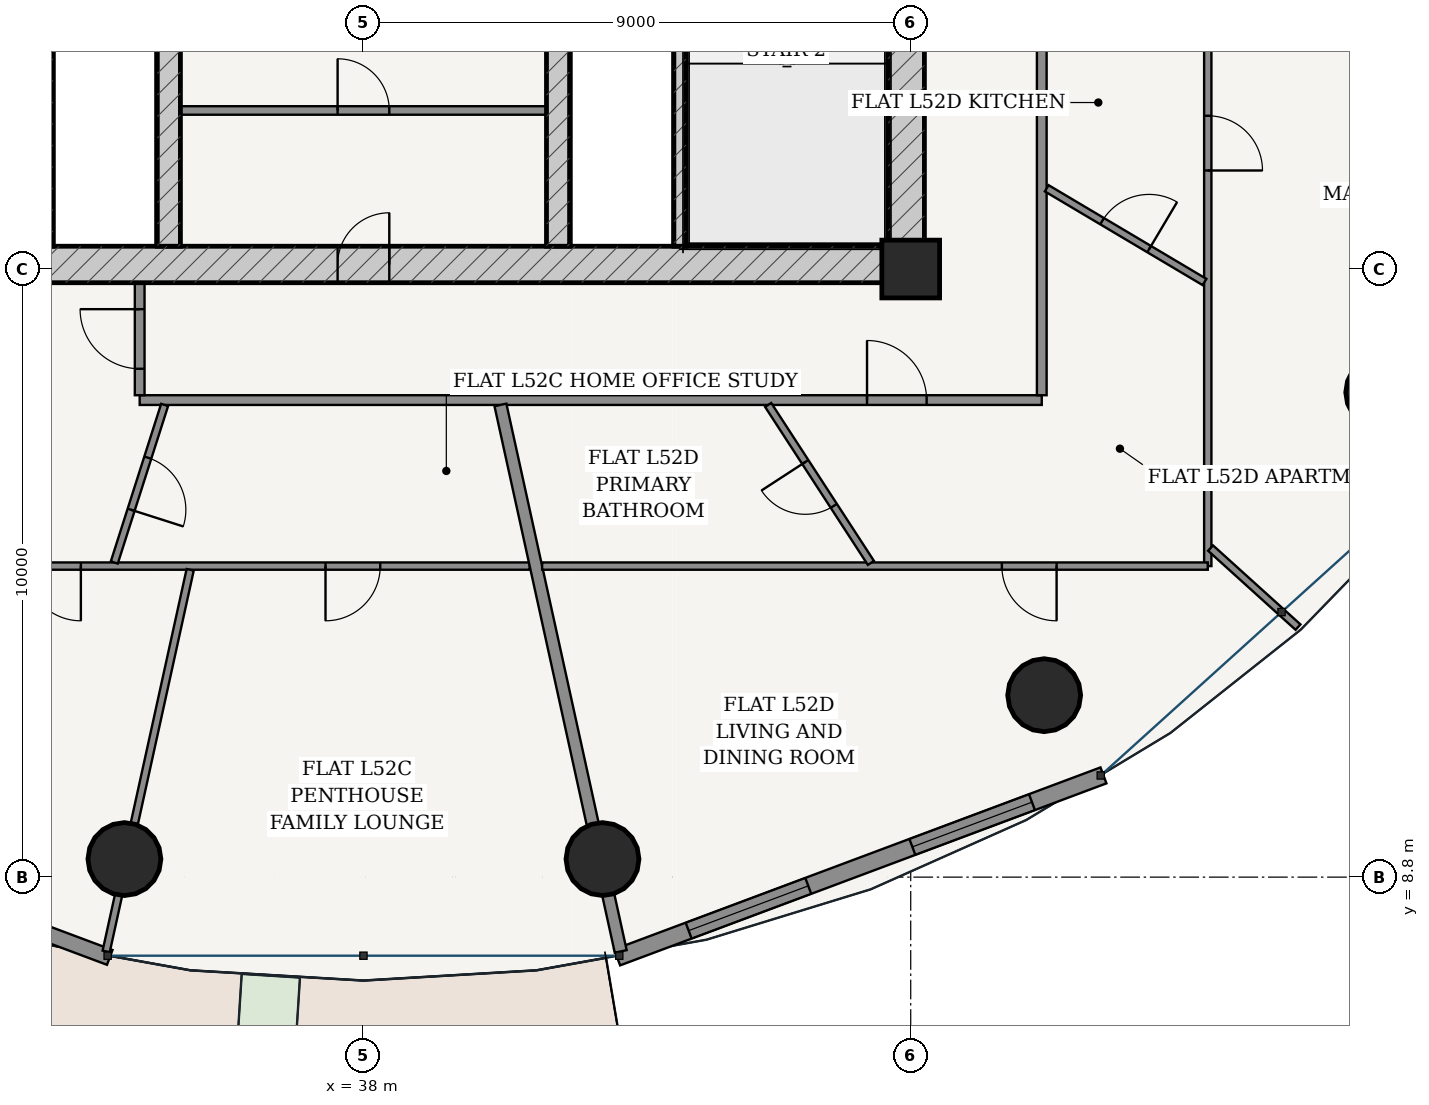
"""IFC4 building model, lengths in metres.
Left out: names, types, materials, properties, quantities, classifications, styles, units other than length and angle.
Written with IfcOpenShell. Run it as: python <this file> out.ifc"""

import sys

from ifc_helpers import new_model, si_unit, direction, frame, frame_2d, origin, origin_2d, place, context, subcontext, project, spatial, rectangle, hollow_circle, extrude, source, transform, mapped, element, fill, save


model = new_model("IFC4")
c1 = context("Model", 3, precision=1e-05, world=origin(), true_north=direction((-0.2419218956, 0.970295726276)))
c2 = subcontext(c1, "Body", "Model", "MODEL_VIEW")
j1 = project(units=[si_unit("LENGTHUNIT", "METRE"), si_unit("PLANEANGLEUNIT", "RADIAN")], contexts=[c1])
p1 = place(None, origin())
s1 = spatial("IfcSite", under=j1, at=p1, CompositionType="ELEMENT")
p2 = place(p1, origin())
s2 = spatial("IfcBuilding", under=s1, at=p2, CompositionType="ELEMENT")
p3 = place(p2, frame((0.0, 0.0, 198.6)))
s3 = spatial("IfcBuildingStorey", under=s2, at=p3, CompositionType="ELEMENT", Elevation=198.6)
p4 = place(p3, frame((47.0, 18.8, 0.0), z_axis=(0.0, 0.0, 1.0), x_axis=(1.0, 0.0, 0.0)))
e1 = element("IfcColumn", 1, at=p4, inside=s3, PredefinedType="COLUMN", context=c2, shape_type="SweptSolid", body=[
    extrude(rectangle(XDim=0.95, YDim=0.95, at=origin_2d()), origin(), (0.0, 0.0, 1.0), 3.7),
])
p5 = place(p3, frame((28.775, 18.875, 0.0), z_axis=(0.0, 0.0, 1.0), x_axis=(1.0, 0.0, 0.0)))
e2 = element("IfcWall", 2, at=p5, inside=s3, PredefinedType="SHEAR", context=c2, shape_type="SweptSolid", body=[
    extrude(rectangle(XDim=18.45, YDim=0.6, at=frame_2d((9.225, 0.0))), origin(), (0.0, 0.0, 1.0), 3.435),
])
p6 = place(p5, frame((8.8, 0.0, 0.0)))
e3 = element("IfcOpeningElement", 3, at=p6, cuts=e2, PredefinedType="OPENING", context=c2, shape_type="SweptSolid", body=[
    extrude(rectangle(XDim=0.85, YDim=2.1, at=frame_2d((0.425, 1.05))), frame((0.0, 0.31, 0.0), z_axis=(0.0, -1.0, 0.0), x_axis=(1.0, 0.0, 0.0)), (0.0, 0.0, 1.0), 0.62),
])
p7 = place(p3, frame((46.925, 19.175, 0.0), z_axis=(0.0, 0.0, 1.0), x_axis=(0.0, 1.0, 0.0)))
e4 = element("IfcWall", 4, at=p7, inside=s3, PredefinedType="SHEAR", context=c2, shape_type="SweptSolid", body=[
    extrude(rectangle(XDim=15.25, YDim=0.6, at=frame_2d((7.625, 0.0))), origin(), (0.0, 0.0, 1.0), 3.435),
])
p8 = place(p7, frame((9.875, 0.0, 0.0)))
e5 = element("IfcOpeningElement", 5, at=p8, cuts=e4, PredefinedType="OPENING", context=c2, shape_type="SweptSolid", body=[
    extrude(rectangle(XDim=1.5, YDim=2.2, at=frame_2d((0.75, 1.1))), frame((0.0, 0.31, 0.0), z_axis=(0.0, -1.0, 0.0), x_axis=(1.0, 0.0, 0.0)), (0.0, 0.0, 1.0), 0.62),
])
for number, where, z_axis, x_axis in (
    (6, (32.795, 19.175, 0.0), (0.0, 0.0, 1.0), (0.0, 1.0, 0.0)),
    (7, (43.205, 19.175, 0.0), (0.0, 0.0, 1.0), (0.0, 1.0, 0.0)),
):
    element("IfcWall", number, at=place(p3, frame(where, z_axis=z_axis, x_axis=x_axis)), inside=s3, PredefinedType="SOLIDWALL", context=c2, shape_type="SweptSolid", body=[
        extrude(rectangle(XDim=7.375, YDim=0.2, at=frame_2d((3.688, 0.0))), origin(), (0.0, 0.0, 1.0), 3.435),
    ])
p9 = place(p3, frame((34.8, 19.175, 0.0), z_axis=(0.0, 0.0, 1.0), x_axis=(0.0, 1.0, 0.0)))
e8 = element("IfcWall", 8, at=p9, inside=s3, PredefinedType="SHEAR", context=c2, shape_type="SweptSolid", body=[
    extrude(rectangle(XDim=15.25, YDim=0.38, at=frame_2d((7.625, 0.0))), origin(), (0.0, 0.0, 1.0), 3.435),
])
p10 = place(p9, frame((7.8, 0.0, 0.0)))
e9 = element("IfcOpeningElement", 9, at=p10, cuts=e8, PredefinedType="OPENING", context=c2, shape_type="SweptSolid", body=[
    extrude(rectangle(XDim=1.05, YDim=2.15, at=frame_2d((0.525, 1.075))), frame((0.0, 0.2, 0.0), z_axis=(0.0, -1.0, 0.0), x_axis=(1.0, 0.0, 0.0)), (0.0, 0.0, 1.0), 0.4),
])
p11 = place(p3, frame((41.2, 19.175, 0.0), z_axis=(0.0, 0.0, 1.0), x_axis=(0.0, 1.0, 0.0)))
e10 = element("IfcWall", 10, at=p11, inside=s3, PredefinedType="SHEAR", context=c2, shape_type="SweptSolid", body=[
    extrude(rectangle(XDim=15.25, YDim=0.38, at=frame_2d((7.625, 0.0))), origin(), (0.0, 0.0, 1.0), 3.435),
])
p12 = place(p11, frame((7.8, 0.0, 0.0)))
e11 = element("IfcOpeningElement", 11, at=p12, cuts=e10, PredefinedType="OPENING", context=c2, shape_type="SweptSolid", body=[
    extrude(rectangle(XDim=1.05, YDim=2.15, at=frame_2d((0.525, 1.075))), frame((0.0, 0.2, 0.0), z_axis=(0.0, -1.0, 0.0), x_axis=(1.0, 0.0, 0.0)), (0.0, 0.0, 1.0), 0.4),
])
for number, where, z_axis, x_axis in (
    (12, (34.069, 9.097, 0.0), (0.0, 0.0, 1.0), (1.0, 0.0, 0.0)),
    (13, (41.931, 9.097, 0.0), (0.0, 0.0, 1.0), (1.0, 0.0, 0.0)),
    (14, (49.195, 11.792, 0.0), (0.0, 0.0, 1.0), (1.0, 0.0, 0.0)),
    (15, (54.754, 16.772, 0.0), (0.0, 0.0, 1.0), (1.0, 0.0, 0.0)),
):
    element("IfcColumn", number, at=place(p3, frame(where, z_axis=z_axis, x_axis=x_axis)), inside=s3, PredefinedType="COLUMN", context=c2, shape_type="SweptSolid", body=[
        extrude(hollow_circle(Radius=0.6, WallThickness=0.038, at=origin_2d()), origin(), (0.0, 0.0, 1.0), 3.7),
    ])
p13 = place(p3, frame((25.83, 10.473, 0.0), z_axis=(0.0, 0.0, 1.0), x_axis=(0.936556918375, -0.350515532672, 0.0)))
e16 = element("IfcWall", 16, at=p13, inside=s3, PredefinedType="SOLIDWALL", context=c2, shape_type="SweptSolid", body=[
    extrude(rectangle(XDim=8.539, YDim=0.26, at=frame_2d((4.27, 0.0))), origin(), (0.0, 0.0, 1.0), 3.435),
])
p14 = place(p13, frame((3.594, 0.0, 0.0)))
e17 = element("IfcOpeningElement", 17, at=p14, cuts=e16, PredefinedType="OPENING", context=c2, shape_type="SweptSolid", body=[
    extrude(rectangle(XDim=1.35, YDim=2.2, at=frame_2d((0.675, 1.1))), frame((0.0, 0.14, 0.0), z_axis=(0.0, -1.0, 0.0), x_axis=(1.0, 0.0, 0.0)), (0.0, 0.0, 1.0), 0.28),
])
p15 = place(p3, frame((42.172, 7.48, 0.0), z_axis=(0.0, 0.0, 1.0), x_axis=(0.936556918375, 0.350515532672, 0.0)))
e18 = element("IfcWall", 18, at=p15, inside=s3, PredefinedType="SOLIDWALL", context=c2, shape_type="SweptSolid", body=[
    extrude(rectangle(XDim=8.539, YDim=0.28, at=frame_2d((4.27, 0.0))), origin(), (0.0, 0.0, 1.0), 3.435),
])
p16 = place(p15, frame((1.256, 0.0, 0.85)))
e19 = element("IfcOpeningElement", 19, at=p16, cuts=e18, PredefinedType="OPENING", context=c2, shape_type="SweptSolid", body=[
    extrude(rectangle(XDim=2.1, YDim=1.95, at=frame_2d((1.05, 0.975))), frame((0.0, 0.15, 0.0), z_axis=(0.0, -1.0, 0.0), x_axis=(1.0, 0.0, 0.0)), (0.0, 0.0, 1.0), 0.3),
])
p17 = place(p15, frame((5.184, 0.0, 0.85)))
e20 = element("IfcOpeningElement", 20, at=p17, cuts=e18, PredefinedType="OPENING", context=c2, shape_type="SweptSolid", body=[
    extrude(rectangle(XDim=2.1, YDim=1.95, at=frame_2d((1.05, 0.975))), frame((0.0, 0.15, 0.0), z_axis=(0.0, -1.0, 0.0), x_axis=(1.0, 0.0, 0.0)), (0.0, 0.0, 1.0), 0.3),
])
p18 = place(p3, frame((34.99, 21.407, 0.0), z_axis=(0.0, 0.0, 1.0), x_axis=(1.0, 0.0, 0.0)))
e21 = element("IfcWall", 21, at=p18, inside=s3, PredefinedType="PARTITIONING", context=c2, shape_type="SweptSolid", body=[
    extrude(rectangle(XDim=6.02, YDim=0.14, at=frame_2d((3.01, 0.0))), origin(), (0.0, 0.0, 1.0), 3.435),
])
p19 = place(p18, frame((2.585, 0.0, 0.0)))
e22 = element("IfcOpeningElement", 22, at=p19, cuts=e21, PredefinedType="OPENING", context=c2, shape_type="SweptSolid", body=[
    extrude(rectangle(XDim=0.85, YDim=2.1, at=frame_2d((0.425, 1.05))), frame((0.0, 0.08, 0.0), z_axis=(0.0, -1.0, 0.0), x_axis=(1.0, 0.0, 0.0)), (0.0, 0.0, 1.0), 0.16),
])
p20 = place(p3, frame((34.32, 16.645, 0.0), z_axis=(0.0, 0.0, 1.0), x_axis=(1.0, 0.0, 0.0)))
e23 = element("IfcWall", 23, at=p20, inside=s3, PredefinedType="PARTITIONING", context=c2, shape_type="SweptSolid", body=[
    extrude(rectangle(XDim=14.835, YDim=0.16, at=frame_2d((7.417, 0.0))), origin(), (0.0, 0.0, 1.0), 2.951),
])
p21 = place(p20, frame((11.961, 0.0, 0.0)))
e24 = element("IfcOpeningElement", 24, at=p21, cuts=e23, PredefinedType="OPENING", context=c2, shape_type="SweptSolid", body=[
    extrude(rectangle(XDim=0.98, YDim=2.2, at=frame_2d((0.49, 1.1))), frame((0.0, 0.09, 0.0), z_axis=(0.0, -1.0, 0.0), x_axis=(1.0, 0.0, 0.0)), (0.0, 0.0, 1.0), 0.18),
])
p22 = place(p3, frame((34.32, 16.725, 0.0), z_axis=(0.0, 0.0, 1.0), x_axis=(0.0, 1.0, 0.0)))
e25 = element("IfcWall", 25, at=p22, inside=s3, PredefinedType="PARTITIONING", context=c2, shape_type="SweptSolid", body=[
    extrude(rectangle(XDim=1.85, YDim=0.16, at=frame_2d((0.925, 0.0))), origin(), (0.0, 0.0, 1.0), 3.435),
])
p23 = place(p22, frame((0.435, 0.0, 0.0)))
e26 = element("IfcOpeningElement", 26, at=p23, cuts=e25, PredefinedType="OPENING", context=c2, shape_type="SweptSolid", body=[
    extrude(rectangle(XDim=0.98, YDim=2.2, at=frame_2d((0.49, 1.1))), frame((0.0, 0.09, 0.0), z_axis=(0.0, -1.0, 0.0), x_axis=(1.0, 0.0, 0.0)), (0.0, 0.0, 1.0), 0.18),
])
p24 = place(p3, frame((49.155, 16.725, 0.0), z_axis=(0.0, 0.0, 1.0), x_axis=(0.0, 1.0, 0.0)))
e27 = element("IfcWall", 27, at=p24, inside=s3, PredefinedType="PARTITIONING", context=c2, shape_type="SweptSolid", body=[
    extrude(rectangle(XDim=18.3, YDim=0.16, at=frame_2d((9.15, 0.0))), origin(), (0.0, 0.0, 1.0), 2.951),
])
p25 = place(p3, frame((40.734, 13.915, 0.0), z_axis=(0.0, 0.0, 1.0), x_axis=(-1.0, 0.0, 0.0)))
e28 = element("IfcWall", 28, at=p25, inside=s3, PredefinedType="PARTITIONING", context=c2, shape_type="SweptSolid", body=[
    extrude(rectangle(XDim=9.144, YDim=0.12, at=frame_2d((4.572, 0.0))), origin(), (0.0, 0.0, 1.0), 2.951),
])
p26 = place(p25, frame((7.381, 0.0, 0.0)))
e29 = element("IfcOpeningElement", 29, at=p26, cuts=e28, PredefinedType="OPENING", context=c2, shape_type="SweptSolid", body=[
    extrude(rectangle(XDim=0.9, YDim=2.15, at=frame_2d((0.45, 1.075))), frame((0.0, 0.07, 0.0), z_axis=(0.0, -1.0, 0.0), x_axis=(1.0, 0.0, 0.0)), (0.0, 0.0, 1.0), 0.14),
])
p27 = place(p25, frame((2.458, 0.0, 0.0)))
e30 = element("IfcOpeningElement", 30, at=p27, cuts=e28, PredefinedType="OPENING", context=c2, shape_type="SweptSolid", body=[
    extrude(rectangle(XDim=0.9, YDim=2.15, at=frame_2d((0.45, 1.075))), frame((0.0, 0.07, 0.0), z_axis=(0.0, -1.0, 0.0), x_axis=(1.0, 0.0, 0.0)), (0.0, 0.0, 1.0), 0.14),
])
p28 = place(p3, frame((35.15, 13.854, 0.0), z_axis=(0.0, 0.0, 1.0), x_axis=(-0.214942949264, -0.976626606519, 0.0)))
e31 = element("IfcWall", 31, at=p28, inside=s3, PredefinedType="PARTITIONING", context=c2, shape_type="SweptSolid", body=[
    extrude(rectangle(XDim=6.427, YDim=0.12, at=frame_2d((3.213, 0.0))), origin(), (0.0, 0.0, 1.0), 2.951),
])
p29 = place(p3, frame((34.73, 16.565, 0.0), z_axis=(0.0, 0.0, 1.0), x_axis=(-0.304300161081, -0.952576197459, 0.0)))
e32 = element("IfcWall", 32, at=p29, inside=s3, PredefinedType="PARTITIONING", context=c2, shape_type="SweptSolid", body=[
    extrude(rectangle(XDim=2.72, YDim=0.12, at=frame_2d((1.36, 0.0))), origin(), (0.0, 0.0, 1.0), 3.11),
])
p30 = place(p29, frame((0.91, 0.0, 0.0)))
e33 = element("IfcOpeningElement", 33, at=p30, cuts=e32, PredefinedType="OPENING", context=c2, shape_type="SweptSolid", body=[
    extrude(rectangle(XDim=0.9, YDim=2.15, at=frame_2d((0.45, 1.075))), frame((0.0, 0.07, 0.0), z_axis=(0.0, -1.0, 0.0), x_axis=(1.0, 0.0, 0.0)), (0.0, 0.0, 1.0), 0.14),
])
p31 = place(p3, frame((40.253, 16.565, 0.0), z_axis=(0.0, 0.0, 1.0), x_axis=(0.214957946814, -0.976623305631, 0.0)))
e34 = element("IfcWall", 34, at=p31, inside=s3, PredefinedType="PARTITIONING", context=c2, shape_type="SweptSolid", body=[
    extrude(rectangle(XDim=9.202, YDim=0.2, at=frame_2d((4.601, 0.0))), origin(), (0.0, 0.0, 1.0), 2.951),
])
p32 = place(p3, frame((51.885, 29.194, 0.0), z_axis=(0.0, 0.0, 1.0), x_axis=(0.0, -1.0, 0.0)))
e35 = element("IfcWall", 35, at=p32, inside=s3, PredefinedType="PARTITIONING", context=c2, shape_type="SweptSolid", body=[
    extrude(rectangle(XDim=15.279, YDim=0.12, at=frame_2d((7.639, 0.0))), origin(), (0.0, 0.0, 1.0), 2.951),
])
p33 = place(p32, frame((7.873, 0.0, 0.0)))
e36 = element("IfcOpeningElement", 36, at=p33, cuts=e35, PredefinedType="OPENING", context=c2, shape_type="SweptSolid", body=[
    extrude(rectangle(XDim=0.9, YDim=2.15, at=frame_2d((0.45, 1.075))), frame((0.0, 0.07, 0.0), z_axis=(0.0, -1.0, 0.0), x_axis=(1.0, 0.0, 0.0)), (0.0, 0.0, 1.0), 0.14),
])
p34 = place(p3, frame((51.885, 13.915, 0.0), z_axis=(0.0, 0.0, 1.0), x_axis=(-1.0, 0.0, 0.0)))
e37 = element("IfcWall", 37, at=p34, inside=s3, PredefinedType="PARTITIONING", context=c2, shape_type="SweptSolid", body=[
    extrude(rectangle(XDim=10.947, YDim=0.12, at=frame_2d((5.473, 0.0))), origin(), (0.0, 0.0, 1.0), 2.951),
])
p35 = place(p34, frame((2.486, 0.0, 0.0)))
e38 = element("IfcOpeningElement", 38, at=p35, cuts=e37, PredefinedType="OPENING", context=c2, shape_type="SweptSolid", body=[
    extrude(rectangle(XDim=0.9, YDim=2.15, at=frame_2d((0.45, 1.075))), frame((0.0, 0.07, 0.0), z_axis=(0.0, -1.0, 0.0), x_axis=(1.0, 0.0, 0.0)), (0.0, 0.0, 1.0), 0.14),
])
p36 = place(p3, frame((51.931, 14.211, 0.0), z_axis=(0.0, 0.0, 1.0), x_axis=(0.741971265209, -0.670431683026, 0.0)))
e39 = element("IfcWall", 39, at=p36, inside=s3, PredefinedType="PARTITIONING", context=c2, shape_type="SweptSolid", body=[
    extrude(rectangle(XDim=1.938, YDim=0.12, at=frame_2d((0.969, 0.0))), origin(), (0.0, 0.0, 1.0), 2.951),
])
p37 = place(p3, frame((44.656, 16.565, 0.0), z_axis=(0.0, 0.0, 1.0), x_axis=(0.545173870382, -0.838322999239, 0.0)))
e40 = element("IfcWall", 40, at=p37, inside=s3, PredefinedType="PARTITIONING", context=c2, shape_type="SweptSolid", body=[
    extrude(rectangle(XDim=3.099, YDim=0.12, at=frame_2d((1.549, 0.0))), origin(), (0.0, 0.0, 1.0), 3.11),
])
p38 = place(p37, frame((1.119, 0.0, 0.0)))
e41 = element("IfcOpeningElement", 41, at=p38, cuts=e40, PredefinedType="OPENING", context=c2, shape_type="SweptSolid", body=[
    extrude(rectangle(XDim=0.86, YDim=2.15, at=frame_2d((0.43, 1.075))), frame((0.0, 0.07, 0.0), z_axis=(0.0, -1.0, 0.0), x_axis=(1.0, 0.0, 0.0)), (0.0, 0.0, 1.0), 0.14),
])
p39 = place(p3, frame((49.237, 20.128, 0.0), z_axis=(0.0, 0.0, 1.0), x_axis=(0.859818120481, -0.510600430565, 0.0)))
e42 = element("IfcWall", 42, at=p39, inside=s3, PredefinedType="PARTITIONING", context=c2, shape_type="SweptSolid", body=[
    extrude(rectangle(XDim=3.018, YDim=0.12, at=frame_2d((1.509, 0.0))), origin(), (0.0, 0.0, 1.0), 2.951),
])
p40 = place(p39, frame((1.059, 0.0, 0.0)))
e43 = element("IfcOpeningElement", 43, at=p40, cuts=e42, PredefinedType="OPENING", context=c2, shape_type="SweptSolid", body=[
    extrude(rectangle(XDim=0.9, YDim=2.15, at=frame_2d((0.45, 1.075))), frame((0.0, 0.07, 0.0), z_axis=(0.0, -1.0, 0.0), x_axis=(1.0, 0.0, 0.0)), (0.0, 0.0, 1.0), 0.14),
])
m1 = source(origin(), c2, "Body", "SweptSolid", [
    extrude(rectangle(XDim=2.1, YDim=1.95, at=frame_2d((1.05, 0.975))), frame((0.0, 0.03, 0.0), z_axis=(0.0, -1.0, 0.0), x_axis=(1.0, 0.0, 0.0)), (0.0, 0.0, 1.0), 0.06),
])
p41 = place(p16, origin())
e44 = element("IfcWindow", 44, at=p41, inside=s3, PartitioningType="SINGLE_PANEL", PredefinedType="WINDOW", context=c2, shape_type="MappedRepresentation", body=[
    mapped(m1, transform((0.0, 0.0, 0.0), scale=1.0)),
])
fill(e19, e44)
p42 = place(p17, origin())
e45 = element("IfcWindow", 45, at=p42, inside=s3, PartitioningType="SINGLE_PANEL", PredefinedType="WINDOW", context=c2, shape_type="MappedRepresentation", body=[
    mapped(m1, transform((0.0, 0.0, 0.0), scale=1.0)),
])
fill(e20, e45)
m2 = source(origin(), c2, "Body", "SweptSolid", [
    extrude(rectangle(XDim=0.85, YDim=2.1, at=frame_2d((0.425, 1.05))), frame((0.0, 0.025, 0.0), z_axis=(0.0, -1.0, 0.0), x_axis=(1.0, 0.0, 0.0)), (0.0, 0.0, 1.0), 0.05),
])
p43 = place(p6, origin())
e46 = element("IfcDoor", 46, at=p43, inside=s3, OperationType="SINGLE_SWING_RIGHT", PredefinedType="DOOR", context=c2, shape_type="MappedRepresentation", body=[
    mapped(m2, transform((0.0, 0.0, 0.0), scale=1.0)),
])
fill(e3, e46)
p44 = place(p19, origin())
e47 = element("IfcDoor", 47, at=p44, inside=s3, OperationType="SINGLE_SWING_LEFT", PredefinedType="DOOR", context=c2, shape_type="MappedRepresentation", body=[
    mapped(m2, transform((0.0, 0.0, 0.0), scale=1.0)),
])
fill(e22, e47)
m3 = source(origin(), c2, "Body", "SweptSolid", [
    extrude(rectangle(XDim=0.98, YDim=2.2, at=frame_2d((0.49, 1.1))), frame((0.0, 0.025, 0.0), z_axis=(0.0, -1.0, 0.0), x_axis=(1.0, 0.0, 0.0)), (0.0, 0.0, 1.0), 0.05),
])
p45 = place(p23, origin())
e48 = element("IfcDoor", 48, at=p45, inside=s3, OperationType="SINGLE_SWING_RIGHT", PredefinedType="DOOR", context=c2, shape_type="MappedRepresentation", body=[
    mapped(m3, transform((0.0, 0.0, 0.0), scale=1.0)),
])
fill(e26, e48)
m4 = source(origin(), c2, "Body", "SweptSolid", [
    extrude(rectangle(XDim=0.9, YDim=2.15, at=frame_2d((0.45, 1.075))), frame((0.0, 0.025, 0.0), z_axis=(0.0, -1.0, 0.0), x_axis=(1.0, 0.0, 0.0)), (0.0, 0.0, 1.0), 0.05),
])
p46 = place(p30, origin())
e49 = element("IfcDoor", 49, at=p46, inside=s3, OperationType="SINGLE_SWING_RIGHT", PredefinedType="DOOR", context=c2, shape_type="MappedRepresentation", body=[
    mapped(m4, transform((0.0, 0.0, 0.0), scale=1.0)),
])
fill(e33, e49)
p47 = place(p26, origin())
e50 = element("IfcDoor", 50, at=p47, inside=s3, OperationType="SINGLE_SWING_LEFT", PredefinedType="DOOR", context=c2, shape_type="MappedRepresentation", body=[
    mapped(m4, transform((0.0, 0.0, 0.0), scale=1.0)),
])
fill(e29, e50)
p48 = place(p27, origin())
e51 = element("IfcDoor", 51, at=p48, inside=s3, OperationType="SINGLE_SWING_RIGHT", PredefinedType="DOOR", context=c2, shape_type="MappedRepresentation", body=[
    mapped(m4, transform((0.0, 0.0, 0.0), scale=1.0)),
])
fill(e30, e51)
p49 = place(p21, origin())
e52 = element("IfcDoor", 52, at=p49, inside=s3, OperationType="SINGLE_SWING_LEFT", PredefinedType="DOOR", context=c2, shape_type="MappedRepresentation", body=[
    mapped(m3, transform((0.0, 0.0, 0.0), scale=1.0)),
])
fill(e24, e52)
m5 = source(origin(), c2, "Body", "SweptSolid", [
    extrude(rectangle(XDim=0.86, YDim=2.15, at=frame_2d((0.43, 1.075))), frame((0.0, 0.025, 0.0), z_axis=(0.0, -1.0, 0.0), x_axis=(1.0, 0.0, 0.0)), (0.0, 0.0, 1.0), 0.05),
])
p50 = place(p38, frame((0.86, 0.0, 0.0), z_axis=(0.0, 0.0, 1.0), x_axis=(-1.0, 0.0, 0.0)))
e53 = element("IfcDoor", 53, at=p50, inside=s3, OperationType="SINGLE_SWING_RIGHT", PredefinedType="DOOR", context=c2, shape_type="MappedRepresentation", body=[
    mapped(m5, transform((0.0, 0.0, 0.0), scale=1.0)),
])
fill(e41, e53)
p51 = place(p35, origin())
e54 = element("IfcDoor", 54, at=p51, inside=s3, OperationType="SINGLE_SWING_LEFT", PredefinedType="DOOR", context=c2, shape_type="MappedRepresentation", body=[
    mapped(m4, transform((0.0, 0.0, 0.0), scale=1.0)),
])
fill(e38, e54)
p52 = place(p40, origin())
e55 = element("IfcDoor", 55, at=p52, inside=s3, OperationType="SINGLE_SWING_RIGHT", PredefinedType="DOOR", context=c2, shape_type="MappedRepresentation", body=[
    mapped(m4, transform((0.0, 0.0, 0.0), scale=1.0)),
])
fill(e43, e55)
p53 = place(p33, origin())
e56 = element("IfcDoor", 56, at=p53, inside=s3, OperationType="SINGLE_SWING_RIGHT", PredefinedType="DOOR", context=c2, shape_type="MappedRepresentation", body=[
    mapped(m4, transform((0.0, 0.0, 0.0), scale=1.0)),
])
fill(e36, e56)
save(model, sys.argv[1])
